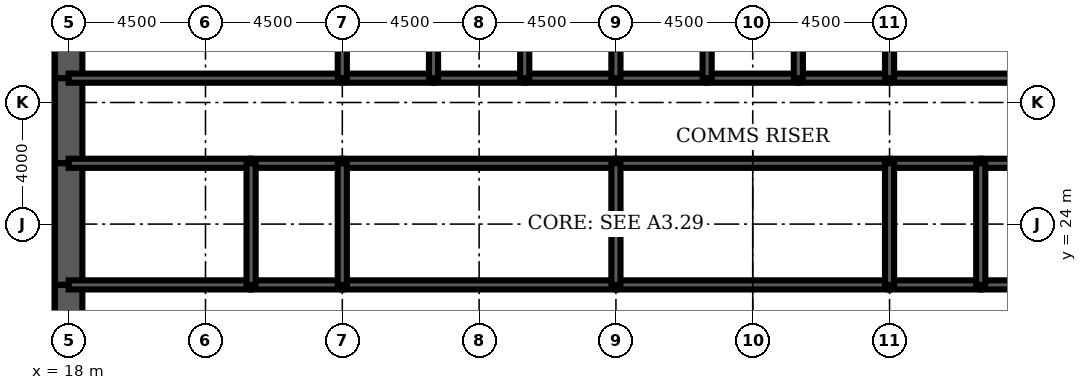
"""IFC4 building model, lengths in metres.
Left out: names, types, materials, properties, quantities, classifications, styles, units other than length and angle.
Written with IfcOpenShell. Run it as: python <this file> out.ifc"""

import sys

from ifc_helpers import new_model, si_unit, direction, frame, frame_2d, origin, place, context, subcontext, project, spatial, rectangle, extrude, element, fill, save


model = new_model("IFC4")
c1 = context("Model", 3, precision=1e-05, world=origin(), true_north=direction((0.0, 1.0)))
c2 = subcontext(c1, "Body", "Model", "MODEL_VIEW")
j1 = project(units=[si_unit("LENGTHUNIT", "METRE"), si_unit("PLANEANGLEUNIT", "RADIAN")], contexts=[c1])
p1 = place(None, origin())
s1 = spatial("IfcSite", under=j1, at=p1, CompositionType="ELEMENT")
p2 = place(p1, origin())
s2 = spatial("IfcBuilding", under=s1, at=p2, CompositionType="ELEMENT")
p3 = place(p2, frame((0.0, 0.0, 125.7)))
s3 = spatial("IfcBuildingStorey", under=s2, at=p3, CompositionType="ELEMENT", Elevation=125.7)
p4 = place(p3, frame((18.0, 32.0, 0.0), z_axis=(0.0, 0.0, 1.0), x_axis=(0.0, -1.0, 0.0)))
e1 = element("IfcWall", 1, at=p4, inside=s3, PredefinedType="SHEAR", context=c2, shape_type="SweptSolid", body=[
    extrude(rectangle(XDim=3.2, YDim=0.9, at=frame_2d((1.6, 0.0))), origin(), (0.0, 0.0, 1.0), 4.2),
])
p5 = place(p3, frame((18.0, 28.8, 0.0), z_axis=(0.0, 0.0, 1.0), x_axis=(0.0, -1.0, 0.0)))
e2 = element("IfcWall", 2, at=p5, inside=s3, PredefinedType="SHEAR", context=c2, shape_type="SweptSolid", body=[
    extrude(rectangle(XDim=2.8, YDim=0.9, at=frame_2d((1.4, 0.0))), origin(), (0.0, 0.0, 1.0), 4.2),
])
p6 = place(p5, frame((0.4, 0.0, 0.0)))
e3 = element("IfcOpeningElement", 3, at=p6, cuts=e2, PredefinedType="OPENING", context=c2, shape_type="SweptSolid", body=[
    extrude(rectangle(XDim=1.8, YDim=2.1, at=frame_2d((0.9, 1.05))), frame((0.0, 0.46, 0.0), z_axis=(0.0, -1.0, 0.0), x_axis=(1.0, 0.0, 0.0)), (0.0, 0.0, 1.0), 0.92),
])
p7 = place(p3, frame((18.0, 26.0, 0.0), z_axis=(0.0, 0.0, 1.0), x_axis=(0.0, -1.0, 0.0)))
e4 = element("IfcWall", 4, at=p7, inside=s3, PredefinedType="SHEAR", context=c2, shape_type="SweptSolid", body=[
    extrude(rectangle(XDim=4.0, YDim=0.9, at=frame_2d((2.0, 0.0))), origin(), (0.0, 0.0, 1.0), 4.2),
])
p8 = place(p3, frame((18.0, 22.0, 0.0), z_axis=(0.0, 0.0, 1.0), x_axis=(0.0, -1.0, 0.0)))
e5 = element("IfcWall", 5, at=p8, inside=s3, PredefinedType="SHEAR", context=c2, shape_type="SweptSolid", body=[
    extrude(rectangle(XDim=2.8, YDim=0.9, at=frame_2d((1.4, 0.0))), origin(), (0.0, 0.0, 1.0), 4.2),
])
p9 = place(p8, frame((0.6, 0.0, 0.0)))
e6 = element("IfcOpeningElement", 6, at=p9, cuts=e5, PredefinedType="OPENING", context=c2, shape_type="SweptSolid", body=[
    extrude(rectangle(XDim=1.8, YDim=2.1, at=frame_2d((0.9, 1.05))), frame((0.0, 0.46, 0.0), z_axis=(0.0, -1.0, 0.0), x_axis=(1.0, 0.0, 0.0)), (0.0, 0.0, 1.0), 0.92),
])
p10 = place(p3, frame((18.0, 28.8, 0.0), z_axis=(0.0, 0.0, 1.0), x_axis=(1.0, 0.0, 0.0)))
e7 = element("IfcWall", 7, at=p10, inside=s3, PredefinedType="SOLIDWALL", context=c2, shape_type="SweptSolid", body=[
    extrude(rectangle(XDim=9.0, YDim=0.3, at=frame_2d((4.5, 0.0))), origin(), (0.0, 0.0, 1.0), 4.2),
])
p11 = place(p10, frame((0.65, 0.0, 0.0)))
e8 = element("IfcOpeningElement", 8, at=p11, cuts=e7, PredefinedType="OPENING", context=c2, shape_type="SweptSolid", body=[
    extrude(rectangle(XDim=1.0, YDim=2.1, at=frame_2d((0.5, 1.05))), frame((0.0, 0.16, 0.0), z_axis=(0.0, -1.0, 0.0), x_axis=(1.0, 0.0, 0.0)), (0.0, 0.0, 1.0), 0.32),
])
p12 = place(p3, frame((27.0, 28.8, 0.0), z_axis=(0.0, 0.0, 1.0), x_axis=(1.0, 0.0, 0.0)))
e9 = element("IfcWall", 9, at=p12, inside=s3, PredefinedType="SOLIDWALL", context=c2, shape_type="SweptSolid", body=[
    extrude(rectangle(XDim=3.0, YDim=0.3, at=frame_2d((1.5, 0.0))), origin(), (0.0, 0.0, 1.0), 4.2),
])
p13 = place(p12, frame((0.95, 0.0, 0.0)))
e10 = element("IfcOpeningElement", 10, at=p13, cuts=e9, PredefinedType="OPENING", context=c2, shape_type="SweptSolid", body=[
    extrude(rectangle(XDim=1.1, YDim=2.2, at=frame_2d((0.55, 1.1))), frame((0.0, 0.16, 0.0), z_axis=(0.0, -1.0, 0.0), x_axis=(1.0, 0.0, 0.0)), (0.0, 0.0, 1.0), 0.32),
])
p14 = place(p3, frame((30.0, 28.8, 0.0), z_axis=(0.0, 0.0, 1.0), x_axis=(1.0, 0.0, 0.0)))
e11 = element("IfcWall", 11, at=p14, inside=s3, PredefinedType="SOLIDWALL", context=c2, shape_type="SweptSolid", body=[
    extrude(rectangle(XDim=3.0, YDim=0.3, at=frame_2d((1.5, 0.0))), origin(), (0.0, 0.0, 1.0), 4.2),
])
p15 = place(p14, frame((0.95, 0.0, 0.0)))
e12 = element("IfcOpeningElement", 12, at=p15, cuts=e11, PredefinedType="OPENING", context=c2, shape_type="SweptSolid", body=[
    extrude(rectangle(XDim=1.1, YDim=2.2, at=frame_2d((0.55, 1.1))), frame((0.0, 0.16, 0.0), z_axis=(0.0, -1.0, 0.0), x_axis=(1.0, 0.0, 0.0)), (0.0, 0.0, 1.0), 0.32),
])
p16 = place(p3, frame((33.0, 28.8, 0.0), z_axis=(0.0, 0.0, 1.0), x_axis=(1.0, 0.0, 0.0)))
e13 = element("IfcWall", 13, at=p16, inside=s3, PredefinedType="SOLIDWALL", context=c2, shape_type="SweptSolid", body=[
    extrude(rectangle(XDim=3.0, YDim=0.3, at=frame_2d((1.5, 0.0))), origin(), (0.0, 0.0, 1.0), 4.2),
])
p17 = place(p16, frame((0.95, 0.0, 0.0)))
e14 = element("IfcOpeningElement", 14, at=p17, cuts=e13, PredefinedType="OPENING", context=c2, shape_type="SweptSolid", body=[
    extrude(rectangle(XDim=1.1, YDim=2.2, at=frame_2d((0.55, 1.1))), frame((0.0, 0.16, 0.0), z_axis=(0.0, -1.0, 0.0), x_axis=(1.0, 0.0, 0.0)), (0.0, 0.0, 1.0), 0.32),
])
for number, where, z_axis, x_axis in (
    (15, (36.0, 28.8, 0.0), (0.0, 0.0, 1.0), (1.0, 0.0, 0.0)),
    (16, (39.0, 28.8, 0.0), (0.0, 0.0, 1.0), (1.0, 0.0, 0.0)),
):
    element("IfcWall", number, at=place(p3, frame(where, z_axis=z_axis, x_axis=x_axis)), inside=s3, PredefinedType="SOLIDWALL", context=c2, shape_type="SweptSolid", body=[
        extrude(rectangle(XDim=3.0, YDim=0.3, at=frame_2d((1.5, 0.0))), origin(), (0.0, 0.0, 1.0), 4.2),
    ])
p18 = place(p3, frame((42.0, 28.8, 0.0), z_axis=(0.0, 0.0, 1.0), x_axis=(1.0, 0.0, 0.0)))
e17 = element("IfcWall", 17, at=p18, inside=s3, PredefinedType="SOLIDWALL", context=c2, shape_type="SweptSolid", body=[
    extrude(rectangle(XDim=3.0, YDim=0.3, at=frame_2d((1.5, 0.0))), origin(), (0.0, 0.0, 1.0), 4.2),
])
p19 = place(p18, frame((0.95, 0.0, 0.0)))
e18 = element("IfcOpeningElement", 18, at=p19, cuts=e17, PredefinedType="OPENING", context=c2, shape_type="SweptSolid", body=[
    extrude(rectangle(XDim=1.1, YDim=2.2, at=frame_2d((0.55, 1.1))), frame((0.0, 0.16, 0.0), z_axis=(0.0, -1.0, 0.0), x_axis=(1.0, 0.0, 0.0)), (0.0, 0.0, 1.0), 0.32),
])
p20 = place(p3, frame((45.0, 28.8, 0.0), z_axis=(0.0, 0.0, 1.0), x_axis=(1.0, 0.0, 0.0)))
e19 = element("IfcWall", 19, at=p20, inside=s3, PredefinedType="SOLIDWALL", context=c2, shape_type="SweptSolid", body=[
    extrude(rectangle(XDim=9.0, YDim=0.3, at=frame_2d((4.5, 0.0))), origin(), (0.0, 0.0, 1.0), 4.2),
])
p21 = place(p20, frame((7.35, 0.0, 0.0)))
e20 = element("IfcOpeningElement", 20, at=p21, cuts=e19, PredefinedType="OPENING", context=c2, shape_type="SweptSolid", body=[
    extrude(rectangle(XDim=1.0, YDim=2.1, at=frame_2d((0.5, 1.05))), frame((0.0, 0.16, 0.0), z_axis=(0.0, -1.0, 0.0), x_axis=(1.0, 0.0, 0.0)), (0.0, 0.0, 1.0), 0.32),
])
p22 = place(p3, frame((18.0, 22.0, 0.0), z_axis=(0.0, 0.0, 1.0), x_axis=(1.0, 0.0, 0.0)))
e21 = element("IfcWall", 21, at=p22, inside=s3, PredefinedType="SOLIDWALL", context=c2, shape_type="SweptSolid", body=[
    extrude(rectangle(XDim=6.0, YDim=0.3, at=frame_2d((3.0, 0.0))), origin(), (0.0, 0.0, 1.0), 4.2),
])
p23 = place(p22, frame((4.4, 0.0, 0.0)))
e22 = element("IfcOpeningElement", 22, at=p23, cuts=e21, PredefinedType="OPENING", context=c2, shape_type="SweptSolid", body=[
    extrude(rectangle(XDim=1.0, YDim=2.1, at=frame_2d((0.5, 1.05))), frame((0.0, 0.16, 0.0), z_axis=(0.0, -1.0, 0.0), x_axis=(1.0, 0.0, 0.0)), (0.0, 0.0, 1.0), 0.32),
])
p24 = place(p22, frame((1.0, 0.0, 0.0)))
e23 = element("IfcOpeningElement", 23, at=p24, cuts=e21, PredefinedType="OPENING", context=c2, shape_type="SweptSolid", body=[
    extrude(rectangle(XDim=1.0, YDim=2.1, at=frame_2d((0.5, 1.05))), frame((0.0, 0.16, 0.0), z_axis=(0.0, -1.0, 0.0), x_axis=(1.0, 0.0, 0.0)), (0.0, 0.0, 1.0), 0.32),
])
p25 = place(p3, frame((24.0, 22.0, 0.0), z_axis=(0.0, 0.0, 1.0), x_axis=(1.0, 0.0, 0.0)))
e24 = element("IfcWall", 24, at=p25, inside=s3, PredefinedType="SOLIDWALL", context=c2, shape_type="SweptSolid", body=[
    extrude(rectangle(XDim=3.0, YDim=0.3, at=frame_2d((1.5, 0.0))), origin(), (0.0, 0.0, 1.0), 4.2),
])
p26 = place(p25, frame((1.0, 0.0, 0.0)))
e25 = element("IfcOpeningElement", 25, at=p26, cuts=e24, PredefinedType="OPENING", context=c2, shape_type="SweptSolid", body=[
    extrude(rectangle(XDim=1.0, YDim=2.1, at=frame_2d((0.5, 1.05))), frame((0.0, 0.16, 0.0), z_axis=(0.0, -1.0, 0.0), x_axis=(1.0, 0.0, 0.0)), (0.0, 0.0, 1.0), 0.32),
])
p27 = place(p3, frame((27.0, 22.0, 0.0), z_axis=(0.0, 0.0, 1.0), x_axis=(1.0, 0.0, 0.0)))
e26 = element("IfcWall", 26, at=p27, inside=s3, PredefinedType="SOLIDWALL", context=c2, shape_type="SweptSolid", body=[
    extrude(rectangle(XDim=9.0, YDim=0.3, at=frame_2d((4.5, 0.0))), origin(), (0.0, 0.0, 1.0), 4.2),
])
p28 = place(p27, frame((4.0, 0.0, 0.0)))
e27 = element("IfcOpeningElement", 27, at=p28, cuts=e26, PredefinedType="OPENING", context=c2, shape_type="SweptSolid", body=[
    extrude(rectangle(XDim=1.0, YDim=2.1, at=frame_2d((0.5, 1.05))), frame((0.0, 0.16, 0.0), z_axis=(0.0, -1.0, 0.0), x_axis=(1.0, 0.0, 0.0)), (0.0, 0.0, 1.0), 0.32),
])
p29 = place(p3, frame((36.0, 22.0, 0.0), z_axis=(0.0, 0.0, 1.0), x_axis=(1.0, 0.0, 0.0)))
e28 = element("IfcWall", 28, at=p29, inside=s3, PredefinedType="SOLIDWALL", context=c2, shape_type="SweptSolid", body=[
    extrude(rectangle(XDim=9.0, YDim=0.3, at=frame_2d((4.5, 0.0))), origin(), (0.0, 0.0, 1.0), 4.2),
])
p30 = place(p29, frame((4.0, 0.0, 0.0)))
e29 = element("IfcOpeningElement", 29, at=p30, cuts=e28, PredefinedType="OPENING", context=c2, shape_type="SweptSolid", body=[
    extrude(rectangle(XDim=1.0, YDim=2.1, at=frame_2d((0.5, 1.05))), frame((0.0, 0.16, 0.0), z_axis=(0.0, -1.0, 0.0), x_axis=(1.0, 0.0, 0.0)), (0.0, 0.0, 1.0), 0.32),
])
p31 = place(p3, frame((45.0, 22.0, 0.0), z_axis=(0.0, 0.0, 1.0), x_axis=(1.0, 0.0, 0.0)))
e30 = element("IfcWall", 30, at=p31, inside=s3, PredefinedType="SOLIDWALL", context=c2, shape_type="SweptSolid", body=[
    extrude(rectangle(XDim=3.0, YDim=0.3, at=frame_2d((1.5, 0.0))), origin(), (0.0, 0.0, 1.0), 4.2),
])
p32 = place(p31, frame((1.0, 0.0, 0.0)))
e31 = element("IfcOpeningElement", 31, at=p32, cuts=e30, PredefinedType="OPENING", context=c2, shape_type="SweptSolid", body=[
    extrude(rectangle(XDim=1.0, YDim=2.1, at=frame_2d((0.5, 1.05))), frame((0.0, 0.16, 0.0), z_axis=(0.0, -1.0, 0.0), x_axis=(1.0, 0.0, 0.0)), (0.0, 0.0, 1.0), 0.32),
])
p33 = place(p3, frame((48.0, 22.0, 0.0), z_axis=(0.0, 0.0, 1.0), x_axis=(1.0, 0.0, 0.0)))
e32 = element("IfcWall", 32, at=p33, inside=s3, PredefinedType="SOLIDWALL", context=c2, shape_type="SweptSolid", body=[
    extrude(rectangle(XDim=6.0, YDim=0.3, at=frame_2d((3.0, 0.0))), origin(), (0.0, 0.0, 1.0), 4.2),
])
p34 = place(p33, frame((2.0, 0.0, 0.0)))
e33 = element("IfcOpeningElement", 33, at=p34, cuts=e32, PredefinedType="OPENING", context=c2, shape_type="SweptSolid", body=[
    extrude(rectangle(XDim=1.0, YDim=2.1, at=frame_2d((0.5, 1.05))), frame((0.0, 0.16, 0.0), z_axis=(0.0, -1.0, 0.0), x_axis=(1.0, 0.0, 0.0)), (0.0, 0.0, 1.0), 0.32),
])
p35 = place(p33, frame((4.3, 0.0, 0.0)))
e34 = element("IfcOpeningElement", 34, at=p35, cuts=e32, PredefinedType="OPENING", context=c2, shape_type="SweptSolid", body=[
    extrude(rectangle(XDim=1.0, YDim=2.1, at=frame_2d((0.5, 1.05))), frame((0.0, 0.16, 0.0), z_axis=(0.0, -1.0, 0.0), x_axis=(1.0, 0.0, 0.0)), (0.0, 0.0, 1.0), 0.32),
])
p36 = place(p3, frame((18.0, 26.0, 0.0), z_axis=(0.0, 0.0, 1.0), x_axis=(1.0, 0.0, 0.0)))
e35 = element("IfcWall", 35, at=p36, inside=s3, PredefinedType="SOLIDWALL", context=c2, shape_type="SweptSolid", body=[
    extrude(rectangle(XDim=6.0, YDim=0.3, at=frame_2d((3.0, 0.0))), origin(), (0.0, 0.0, 1.0), 4.2),
])
p37 = place(p3, frame((24.0, 26.0, 0.0), z_axis=(0.0, 0.0, 1.0), x_axis=(1.0, 0.0, 0.0)))
e36 = element("IfcWall", 36, at=p37, inside=s3, PredefinedType="SOLIDWALL", context=c2, shape_type="SweptSolid", body=[
    extrude(rectangle(XDim=3.0, YDim=0.3, at=frame_2d((1.5, 0.0))), origin(), (0.0, 0.0, 1.0), 4.2),
])
for number, where, z_axis, x_axis in (
    (37, (27.0, 26.0, 0.0), (0.0, 0.0, 1.0), (1.0, 0.0, 0.0)),
    (38, (36.0, 26.0, 0.0), (0.0, 0.0, 1.0), (1.0, 0.0, 0.0)),
):
    element("IfcWall", number, at=place(p3, frame(where, z_axis=z_axis, x_axis=x_axis)), inside=s3, PredefinedType="SOLIDWALL", context=c2, shape_type="SweptSolid", body=[
        extrude(rectangle(XDim=9.0, YDim=0.3, at=frame_2d((4.5, 0.0))), origin(), (0.0, 0.0, 1.0), 4.2),
    ])
p38 = place(p3, frame((45.0, 26.0, 0.0), z_axis=(0.0, 0.0, 1.0), x_axis=(1.0, 0.0, 0.0)))
e39 = element("IfcWall", 39, at=p38, inside=s3, PredefinedType="SOLIDWALL", context=c2, shape_type="SweptSolid", body=[
    extrude(rectangle(XDim=3.0, YDim=0.3, at=frame_2d((1.5, 0.0))), origin(), (0.0, 0.0, 1.0), 4.2),
])
p39 = place(p3, frame((48.0, 26.0, 0.0), z_axis=(0.0, 0.0, 1.0), x_axis=(1.0, 0.0, 0.0)))
e40 = element("IfcWall", 40, at=p39, inside=s3, PredefinedType="SOLIDWALL", context=c2, shape_type="SweptSolid", body=[
    extrude(rectangle(XDim=6.0, YDim=0.3, at=frame_2d((3.0, 0.0))), origin(), (0.0, 0.0, 1.0), 4.2),
])
for number, where, z_axis, x_axis in (
    (41, (27.0, 28.8, 0.0), (0.0, 0.0, 1.0), (0.0, 1.0, 0.0)),
    (42, (30.0, 28.8, 0.0), (0.0, 0.0, 1.0), (0.0, 1.0, 0.0)),
    (43, (33.0, 28.8, 0.0), (0.0, 0.0, 1.0), (0.0, 1.0, 0.0)),
    (44, (36.0, 28.8, 0.0), (0.0, 0.0, 1.0), (0.0, 1.0, 0.0)),
    (45, (39.0, 28.8, 0.0), (0.0, 0.0, 1.0), (0.0, 1.0, 0.0)),
    (46, (42.0, 28.8, 0.0), (0.0, 0.0, 1.0), (0.0, 1.0, 0.0)),
    (47, (45.0, 28.8, 0.0), (0.0, 0.0, 1.0), (0.0, 1.0, 0.0)),
):
    element("IfcWall", number, at=place(p3, frame(where, z_axis=z_axis, x_axis=x_axis)), inside=s3, PredefinedType="SOLIDWALL", context=c2, shape_type="SweptSolid", body=[
        extrude(rectangle(XDim=3.2, YDim=0.3, at=frame_2d((1.6, 0.0))), origin(), (0.0, 0.0, 1.0), 4.2),
    ])
for number, where, z_axis, x_axis in (
    (48, (24.0, 22.0, 0.0), (0.0, 0.0, 1.0), (0.0, 1.0, 0.0)),
    (49, (27.0, 22.0, 0.0), (0.0, 0.0, 1.0), (0.0, 1.0, 0.0)),
    (50, (36.0, 22.0, 0.0), (0.0, 0.0, 1.0), (0.0, 1.0, 0.0)),
    (51, (45.0, 22.0, 0.0), (0.0, 0.0, 1.0), (0.0, 1.0, 0.0)),
    (52, (48.0, 22.0, 0.0), (0.0, 0.0, 1.0), (0.0, 1.0, 0.0)),
):
    element("IfcWall", number, at=place(p3, frame(where, z_axis=z_axis, x_axis=x_axis)), inside=s3, PredefinedType="SOLIDWALL", context=c2, shape_type="SweptSolid", body=[
        extrude(rectangle(XDim=4.0, YDim=0.3, at=frame_2d((2.0, 0.0))), origin(), (0.0, 0.0, 1.0), 4.2),
    ])
p40 = place(p3, frame((42.5, 22.15, 0.0), z_axis=(0.0, 0.0, 1.0), x_axis=(0.0, 1.0, 0.0)))
e53 = element("IfcWall", 53, at=p40, inside=s3, PredefinedType="PARTITIONING", context=c2, shape_type="SweptSolid", body=[
    extrude(rectangle(XDim=3.7, YDim=0.15, at=frame_2d((1.85, 0.0))), origin(), (0.0, 0.0, 1.0), 3.0),
])
p41 = place(p40, frame((2.2, 0.0, 0.0)))
e54 = element("IfcOpeningElement", 54, at=p41, cuts=e53, PredefinedType="OPENING", context=c2, shape_type="SweptSolid", body=[
    extrude(rectangle(XDim=1.0, YDim=2.1, at=frame_2d((0.5, 1.05))), frame((0.0, 0.085, 0.0), z_axis=(0.0, -1.0, 0.0), x_axis=(1.0, 0.0, 0.0)), (0.0, 0.0, 1.0), 0.17),
])
p42 = place(p3, frame((20.625, 22.15, 0.0), z_axis=(0.0, 0.0, 1.0), x_axis=(0.0, 1.0, 0.0)))
e55 = element("IfcWall", 55, at=p42, inside=s3, PredefinedType="PARTITIONING", context=c2, shape_type="SweptSolid", body=[
    extrude(rectangle(XDim=3.7, YDim=0.15, at=frame_2d((1.85, 0.0))), origin(), (0.0, 0.0, 1.0), 3.0),
])
p43 = place(p3, frame((25.2, 26.15, 0.0), z_axis=(0.0, 0.0, 1.0), x_axis=(0.0, 1.0, 0.0)))
e56 = element("IfcWall", 56, at=p43, inside=s3, PredefinedType="PARTITIONING", context=c2, shape_type="SweptSolid", body=[
    extrude(rectangle(XDim=2.5, YDim=0.15, at=frame_2d((1.25, 0.0))), origin(), (0.0, 0.0, 1.0), 3.0),
])
p44 = place(p43, frame((0.35, 0.0, 0.0)))
e57 = element("IfcOpeningElement", 57, at=p44, cuts=e56, PredefinedType="OPENING", context=c2, shape_type="SweptSolid", body=[
    extrude(rectangle(XDim=1.0, YDim=2.1, at=frame_2d((0.5, 1.05))), frame((0.0, 0.085, 0.0), z_axis=(0.0, -1.0, 0.0), x_axis=(1.0, 0.0, 0.0)), (0.0, 0.0, 1.0), 0.17),
])
p45 = place(p41, origin())
e58 = element("IfcDoor", 58, at=p45, inside=s3, OperationType="SINGLE_SWING_RIGHT", PredefinedType="DOOR", context=c2, shape_type="SweptSolid", body=[
    extrude(rectangle(XDim=1.0, YDim=2.1, at=frame_2d((0.5, 1.05))), frame((0.0, 0.025, 0.0), z_axis=(0.0, -1.0, 0.0), x_axis=(1.0, 0.0, 0.0)), (0.0, 0.0, 1.0), 0.05),
])
fill(e54, e58)
p46 = place(p44, origin())
e59 = element("IfcDoor", 59, at=p46, inside=s3, OperationType="SINGLE_SWING_LEFT", PredefinedType="DOOR", context=c2, shape_type="SweptSolid", body=[
    extrude(rectangle(XDim=1.0, YDim=2.1, at=frame_2d((0.5, 1.05))), frame((0.0, 0.025, 0.0), z_axis=(0.0, -1.0, 0.0), x_axis=(1.0, 0.0, 0.0)), (0.0, 0.0, 1.0), 0.05),
])
fill(e57, e59)
p47 = place(p19, origin())
e60 = element("IfcDoor", 60, at=p47, inside=s3, OperationType="DOUBLE_DOOR_SLIDING", PredefinedType="USERDEFINED", context=c2, shape_type="SweptSolid", body=[
    extrude(rectangle(XDim=1.1, YDim=2.2, at=frame_2d((0.55, 1.1))), frame((0.0, 0.025, 0.0), z_axis=(0.0, -1.0, 0.0), x_axis=(1.0, 0.0, 0.0)), (0.0, 0.0, 1.0), 0.05),
])
fill(e18, e60)
p48 = place(p13, origin())
e61 = element("IfcDoor", 61, at=p48, inside=s3, OperationType="DOUBLE_DOOR_SLIDING", PredefinedType="USERDEFINED", context=c2, shape_type="SweptSolid", body=[
    extrude(rectangle(XDim=1.1, YDim=2.2, at=frame_2d((0.55, 1.1))), frame((0.0, 0.025, 0.0), z_axis=(0.0, -1.0, 0.0), x_axis=(1.0, 0.0, 0.0)), (0.0, 0.0, 1.0), 0.05),
])
fill(e10, e61)
p49 = place(p15, origin())
e62 = element("IfcDoor", 62, at=p49, inside=s3, OperationType="DOUBLE_DOOR_SLIDING", PredefinedType="USERDEFINED", context=c2, shape_type="SweptSolid", body=[
    extrude(rectangle(XDim=1.1, YDim=2.2, at=frame_2d((0.55, 1.1))), frame((0.0, 0.025, 0.0), z_axis=(0.0, -1.0, 0.0), x_axis=(1.0, 0.0, 0.0)), (0.0, 0.0, 1.0), 0.05),
])
fill(e12, e62)
p50 = place(p17, origin())
e63 = element("IfcDoor", 63, at=p50, inside=s3, OperationType="DOUBLE_DOOR_SLIDING", PredefinedType="USERDEFINED", context=c2, shape_type="SweptSolid", body=[
    extrude(rectangle(XDim=1.1, YDim=2.2, at=frame_2d((0.55, 1.1))), frame((0.0, 0.025, 0.0), z_axis=(0.0, -1.0, 0.0), x_axis=(1.0, 0.0, 0.0)), (0.0, 0.0, 1.0), 0.05),
])
fill(e14, e63)
p51 = place(p11, origin())
e64 = element("IfcDoor", 64, at=p51, inside=s3, OperationType="SINGLE_SWING_LEFT", PredefinedType="DOOR", context=c2, shape_type="SweptSolid", body=[
    extrude(rectangle(XDim=1.0, YDim=2.1, at=frame_2d((0.5, 1.05))), frame((0.0, 0.025, 0.0), z_axis=(0.0, -1.0, 0.0), x_axis=(1.0, 0.0, 0.0)), (0.0, 0.0, 1.0), 0.05),
])
fill(e8, e64)
p52 = place(p9, origin())
e65 = element("IfcDoor", 65, at=p52, inside=s3, OperationType="SINGLE_SWING_LEFT", PredefinedType="DOOR", context=c2, shape_type="SweptSolid", body=[
    extrude(rectangle(XDim=1.8, YDim=2.1, at=frame_2d((0.9, 1.05))), frame((0.0, 0.45, 0.0), z_axis=(0.0, -1.0, 0.0), x_axis=(1.0, 0.0, 0.0)), (0.0, 0.0, 1.0), 0.899),
])
fill(e6, e65)
p53 = place(p6, origin())
e66 = element("IfcDoor", 66, at=p53, inside=s3, OperationType="SINGLE_SWING_LEFT", PredefinedType="DOOR", context=c2, shape_type="SweptSolid", body=[
    extrude(rectangle(XDim=1.8, YDim=2.1, at=frame_2d((0.9, 1.05))), frame((0.0, 0.45, 0.0), z_axis=(0.0, -1.0, 0.0), x_axis=(1.0, 0.0, 0.0)), (0.0, 0.0, 1.0), 0.899),
])
fill(e3, e66)
p54 = place(p23, origin())
e67 = element("IfcDoor", 67, at=p54, inside=s3, OperationType="SINGLE_SWING_RIGHT", PredefinedType="DOOR", context=c2, shape_type="SweptSolid", body=[
    extrude(rectangle(XDim=1.0, YDim=2.1, at=frame_2d((0.5, 1.05))), frame((0.0, 0.025, 0.0), z_axis=(0.0, -1.0, 0.0), x_axis=(1.0, 0.0, 0.0)), (0.0, 0.0, 1.0), 0.05),
])
fill(e22, e67)
p55 = place(p26, origin())
e68 = element("IfcDoor", 68, at=p55, inside=s3, OperationType="SINGLE_SWING_LEFT", PredefinedType="DOOR", context=c2, shape_type="SweptSolid", body=[
    extrude(rectangle(XDim=1.0, YDim=2.1, at=frame_2d((0.5, 1.05))), frame((0.0, 0.025, 0.0), z_axis=(0.0, -1.0, 0.0), x_axis=(1.0, 0.0, 0.0)), (0.0, 0.0, 1.0), 0.05),
])
fill(e25, e68)
p56 = place(p28, origin())
e69 = element("IfcDoor", 69, at=p56, inside=s3, OperationType="SINGLE_SWING_LEFT", PredefinedType="DOOR", context=c2, shape_type="SweptSolid", body=[
    extrude(rectangle(XDim=1.0, YDim=2.1, at=frame_2d((0.5, 1.05))), frame((0.0, 0.025, 0.0), z_axis=(0.0, -1.0, 0.0), x_axis=(1.0, 0.0, 0.0)), (0.0, 0.0, 1.0), 0.05),
])
fill(e27, e69)
p57 = place(p30, origin())
e70 = element("IfcDoor", 70, at=p57, inside=s3, OperationType="SINGLE_SWING_LEFT", PredefinedType="DOOR", context=c2, shape_type="SweptSolid", body=[
    extrude(rectangle(XDim=1.0, YDim=2.1, at=frame_2d((0.5, 1.05))), frame((0.0, 0.025, 0.0), z_axis=(0.0, -1.0, 0.0), x_axis=(1.0, 0.0, 0.0)), (0.0, 0.0, 1.0), 0.05),
])
fill(e29, e70)
p58 = place(p32, origin())
e71 = element("IfcDoor", 71, at=p58, inside=s3, OperationType="SINGLE_SWING_LEFT", PredefinedType="DOOR", context=c2, shape_type="SweptSolid", body=[
    extrude(rectangle(XDim=1.0, YDim=2.1, at=frame_2d((0.5, 1.05))), frame((0.0, 0.025, 0.0), z_axis=(0.0, -1.0, 0.0), x_axis=(1.0, 0.0, 0.0)), (0.0, 0.0, 1.0), 0.05),
])
fill(e31, e71)
p59 = place(p24, origin())
e72 = element("IfcDoor", 72, at=p59, inside=s3, OperationType="SINGLE_SWING_LEFT", PredefinedType="DOOR", context=c2, shape_type="SweptSolid", body=[
    extrude(rectangle(XDim=1.0, YDim=2.1, at=frame_2d((0.5, 1.05))), frame((0.0, 0.025, 0.0), z_axis=(0.0, -1.0, 0.0), x_axis=(1.0, 0.0, 0.0)), (0.0, 0.0, 1.0), 0.05),
])
fill(e23, e72)
save(model, sys.argv[1])
